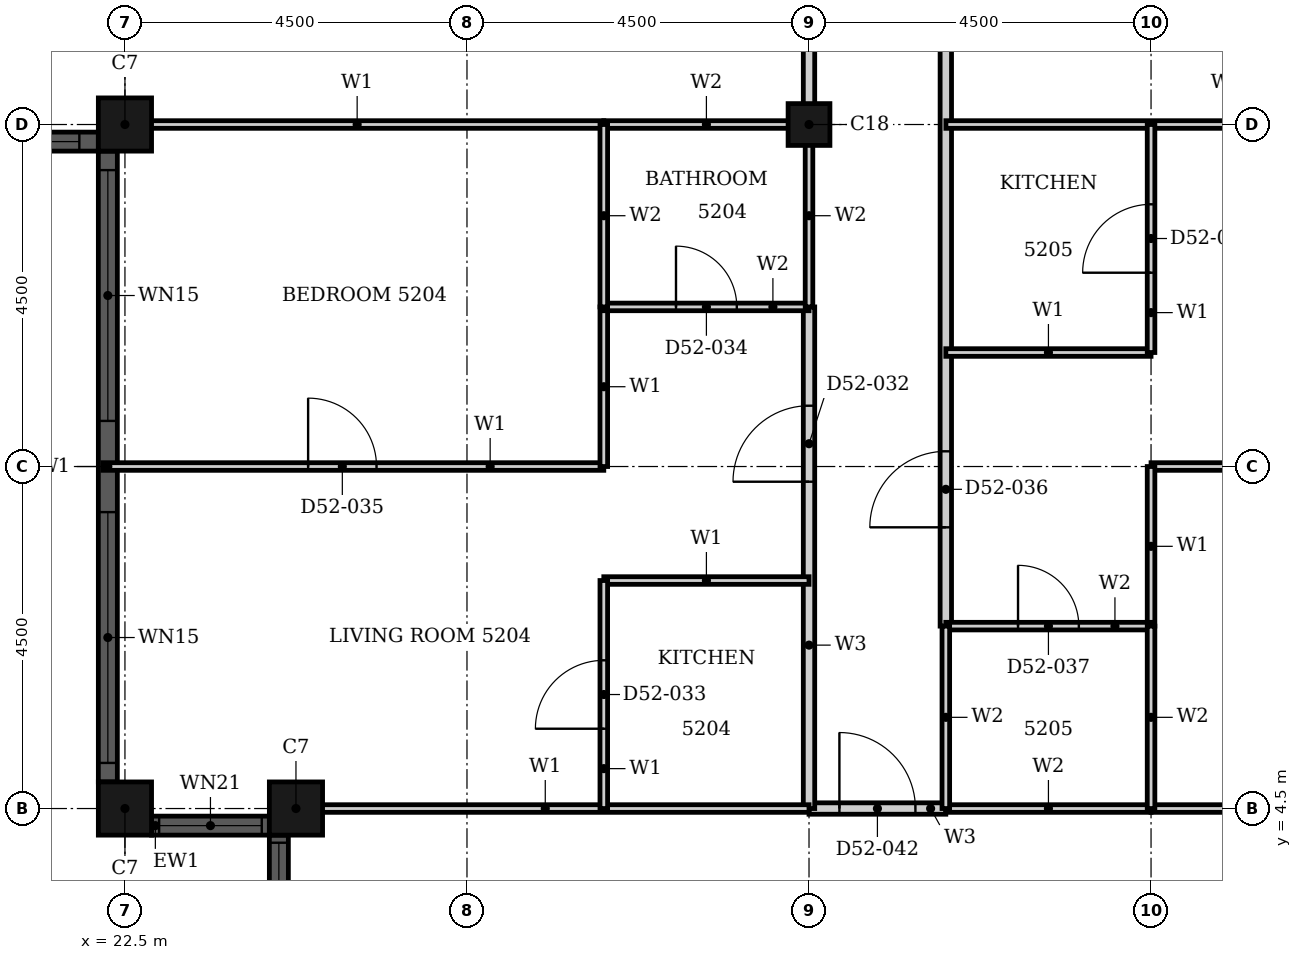
"""IFC4 building model, lengths in metres.
Left out: names, types, materials, properties, quantities, classifications, styles, units other than length and angle.
Written with IfcOpenShell. Run it as: python <this file> out.ifc"""

import sys

from ifc_helpers import new_model, si_unit, direction, frame, frame_2d, origin, origin_2d, place, context, subcontext, project, spatial, rectangle, hollow_rectangle, extrude, element, fill, save


model = new_model("IFC4")
c1 = context("Model", 3, precision=1e-05, world=origin(), true_north=direction((0.0, 1.0)))
c2 = subcontext(c1, "Body", "Model", "MODEL_VIEW")
j1 = project(units=[si_unit("LENGTHUNIT", "METRE"), si_unit("PLANEANGLEUNIT", "RADIAN")], contexts=[c1])
p1 = place(None, origin())
s1 = spatial("IfcSite", under=j1, at=p1, CompositionType="ELEMENT")
p2 = place(p1, origin())
s2 = spatial("IfcBuilding", under=s1, at=p2, CompositionType="ELEMENT")
p3 = place(p2, frame((0.0, 0.0, 207.2)))
s3 = spatial("IfcBuildingStorey", under=s2, at=p3, CompositionType="ELEMENT", Elevation=207.2)
for number, where, z_axis, x_axis in (
    (1, (22.5, 13.5, 0.0), (0.0, 0.0, 1.0), (1.0, 0.0, 0.0)),
    (2, (22.5, 4.5, 0.0), (0.0, 0.0, 1.0), (1.0, 0.0, 0.0)),
    (3, (24.75, 4.5, 0.0), (0.0, 0.0, 1.0), (1.0, 0.0, 0.0)),
):
    element("IfcColumn", number, at=place(p3, frame(where, z_axis=z_axis, x_axis=x_axis)), inside=s3, PredefinedType="COLUMN", context=c2, shape_type="SweptSolid", body=[
        extrude(hollow_rectangle(XDim=0.7, YDim=0.7, WallThickness=0.022, at=origin_2d()), origin(), (0.0, 0.0, 1.0), 3.7),
    ])
p4 = place(p3, frame((31.5, 13.5, 0.0), z_axis=(0.0, 0.0, 1.0), x_axis=(1.0, 0.0, 0.0)))
e4 = element("IfcColumn", 4, at=p4, inside=s3, PredefinedType="COLUMN", context=c2, shape_type="SweptSolid", body=[
    extrude(hollow_rectangle(XDim=0.55, YDim=0.55, WallThickness=0.018, at=origin_2d()), origin(), (0.0, 0.0, 1.0), 3.7),
])
p5 = place(p3, frame((18.35, 13.275, 0.0), z_axis=(0.0, 0.0, 1.0), x_axis=(1.0, 0.0, 0.0)))
e5 = element("IfcWall", 5, at=p5, inside=s3, PredefinedType="SOLIDWALL", context=c2, shape_type="SweptSolid", body=[
    extrude(rectangle(XDim=3.8, YDim=0.25, at=frame_2d((1.9, 0.0))), origin(), (0.0, 0.0, 1.0), 3.7),
])
p6 = place(p5, frame((0.25, 0.0, 0.45)))
e6 = element("IfcOpeningElement", 6, at=p6, cuts=e5, PredefinedType="OPENING", context=c2, shape_type="SweptSolid", body=[
    extrude(rectangle(XDim=3.3, YDim=2.3, at=frame_2d((1.65, 1.15))), frame((0.0, 0.135, 0.0), z_axis=(0.0, -1.0, 0.0), x_axis=(1.0, 0.0, 0.0)), (0.0, 0.0, 1.0), 0.27),
])
p7 = place(p3, frame((22.275, 13.15, 0.0), z_axis=(0.0, 0.0, 1.0), x_axis=(0.0, -1.0, 0.0)))
e7 = element("IfcWall", 7, at=p7, inside=s3, PredefinedType="SOLIDWALL", context=c2, shape_type="SweptSolid", body=[
    extrude(rectangle(XDim=8.3, YDim=0.25, at=frame_2d((4.15, 0.0))), origin(), (0.0, 0.0, 1.0), 3.7),
])
p8 = place(p7, frame((0.25, 0.0, 0.45)))
e8 = element("IfcOpeningElement", 8, at=p8, cuts=e7, PredefinedType="OPENING", context=c2, shape_type="SweptSolid", body=[
    extrude(rectangle(XDim=3.3, YDim=2.3, at=frame_2d((1.65, 1.15))), frame((0.0, 0.135, 0.0), z_axis=(0.0, -1.0, 0.0), x_axis=(1.0, 0.0, 0.0)), (0.0, 0.0, 1.0), 0.27),
])
p9 = place(p7, frame((4.75, 0.0, 0.45)))
e9 = element("IfcOpeningElement", 9, at=p9, cuts=e7, PredefinedType="OPENING", context=c2, shape_type="SweptSolid", body=[
    extrude(rectangle(XDim=3.3, YDim=2.3, at=frame_2d((1.65, 1.15))), frame((0.0, 0.135, 0.0), z_axis=(0.0, -1.0, 0.0), x_axis=(1.0, 0.0, 0.0)), (0.0, 0.0, 1.0), 0.27),
])
p10 = place(p3, frame((22.85, 4.275, 0.0), z_axis=(0.0, 0.0, 1.0), x_axis=(1.0, 0.0, 0.0)))
e10 = element("IfcWall", 10, at=p10, inside=s3, PredefinedType="SOLIDWALL", context=c2, shape_type="SweptSolid", body=[
    extrude(rectangle(XDim=1.55, YDim=0.25, at=frame_2d((0.775, 0.0))), origin(), (0.0, 0.0, 1.0), 3.7),
])
p11 = place(p10, frame((0.1, 0.0, 0.9)))
e11 = element("IfcOpeningElement", 11, at=p11, cuts=e10, PredefinedType="OPENING", context=c2, shape_type="SweptSolid", body=[
    extrude(rectangle(XDim=1.35, YDim=1.85, at=frame_2d((0.675, 0.925))), frame((0.0, 0.135, 0.0), z_axis=(0.0, -1.0, 0.0), x_axis=(1.0, 0.0, 0.0)), (0.0, 0.0, 1.0), 0.27),
])
p12 = place(p3, frame((24.525, 4.15, 0.0), z_axis=(0.0, 0.0, 1.0), x_axis=(0.0, -1.0, 0.0)))
e12 = element("IfcWall", 12, at=p12, inside=s3, PredefinedType="SOLIDWALL", context=c2, shape_type="SweptSolid", body=[
    extrude(rectangle(XDim=1.55, YDim=0.25, at=frame_2d((0.775, 0.0))), origin(), (0.0, 0.0, 1.0), 3.7),
])
p13 = place(p12, frame((0.1, 0.0, 0.9)))
e13 = element("IfcOpeningElement", 13, at=p13, cuts=e12, PredefinedType="OPENING", context=c2, shape_type="SweptSolid", body=[
    extrude(rectangle(XDim=1.35, YDim=1.85, at=frame_2d((0.675, 0.925))), frame((0.0, 0.135, 0.0), z_axis=(0.0, -1.0, 0.0), x_axis=(1.0, 0.0, 0.0)), (0.0, 0.0, 1.0), 0.27),
])
p14 = place(p3, frame((31.5, 4.5, 0.0), z_axis=(0.0, 0.0, 1.0), x_axis=(1.0, 0.0, 0.0)))
e14 = element("IfcWall", 14, at=p14, inside=s3, PredefinedType="PARTITIONING", context=c2, shape_type="SweptSolid", body=[
    extrude(rectangle(XDim=1.8, YDim=0.15, at=frame_2d((0.9, 0.0))), origin(), (0.0, 0.0, 1.0), 3.4),
])
p15 = place(p14, frame((0.4, 0.0, 0.0)))
e15 = element("IfcOpeningElement", 15, at=p15, cuts=e14, PredefinedType="OPENING", context=c2, shape_type="SweptSolid", body=[
    extrude(rectangle(XDim=1.0, YDim=2.1, at=frame_2d((0.5, 1.05))), frame((0.0, 0.085, 0.0), z_axis=(0.0, -1.0, 0.0), x_axis=(1.0, 0.0, 0.0)), (0.0, 0.0, 1.0), 0.17),
])
p16 = place(p3, frame((31.5, 4.5, 0.0), z_axis=(0.0, 0.0, 1.0), x_axis=(0.0, 1.0, 0.0)))
e16 = element("IfcWall", 16, at=p16, inside=s3, PredefinedType="PARTITIONING", context=c2, shape_type="SweptSolid", body=[
    extrude(rectangle(XDim=6.6, YDim=0.15, at=frame_2d((3.3, 0.0))), origin(), (0.0, 0.0, 1.0), 2.68),
])
p17 = place(p16, frame((4.3, 0.0, 0.0)))
e17 = element("IfcOpeningElement", 17, at=p17, cuts=e16, PredefinedType="OPENING", context=c2, shape_type="SweptSolid", body=[
    extrude(rectangle(XDim=1.0, YDim=2.2, at=frame_2d((0.5, 1.1))), frame((0.0, 0.085, 0.0), z_axis=(0.0, -1.0, 0.0), x_axis=(1.0, 0.0, 0.0)), (0.0, 0.0, 1.0), 0.17),
])
p18 = place(p3, frame((31.5, 13.5, 0.0), z_axis=(0.0, 0.0, 1.0), x_axis=(0.0, 1.0, 0.0)))
e18 = element("IfcWall", 18, at=p18, inside=s3, PredefinedType="PARTITIONING", context=c2, shape_type="SweptSolid", body=[
    extrude(rectangle(XDim=7.2, YDim=0.15, at=frame_2d((3.6, 0.0))), origin(), (0.0, 0.0, 1.0), 3.4),
])
p19 = place(p3, frame((33.3, 6.9, 0.0), z_axis=(0.0, 0.0, 1.0), x_axis=(0.0, 1.0, 0.0)))
e19 = element("IfcWall", 19, at=p19, inside=s3, PredefinedType="PARTITIONING", context=c2, shape_type="SweptSolid", body=[
    extrude(rectangle(XDim=13.799, YDim=0.15, at=frame_2d((6.899, 0.0))), origin(), (0.0, 0.0, 1.0), 3.4),
])
p20 = place(p19, frame((1.3, 0.0, 0.0)))
e20 = element("IfcOpeningElement", 20, at=p20, cuts=e19, PredefinedType="OPENING", context=c2, shape_type="SweptSolid", body=[
    extrude(rectangle(XDim=1.0, YDim=2.2, at=frame_2d((0.5, 1.1))), frame((0.0, 0.085, 0.0), z_axis=(0.0, -1.0, 0.0), x_axis=(1.0, 0.0, 0.0)), (0.0, 0.0, 1.0), 0.17),
])
p21 = place(p3, frame((33.3, 10.5, 0.0), z_axis=(0.0, 0.0, 1.0), x_axis=(1.0, 0.0, 0.0)))
e21 = element("IfcWall", 21, at=p21, inside=s3, PredefinedType="PARTITIONING", context=c2, shape_type="SweptSolid", body=[
    extrude(rectangle(XDim=2.7, YDim=0.1, at=frame_2d((1.35, 0.0))), origin(), (0.0, 0.0, 1.0), 3.4),
])
p22 = place(p3, frame((33.301, 13.5, 0.0), z_axis=(0.0, 0.0, 1.0), x_axis=(1.0, 0.0, 0.0)))
e22 = element("IfcWall", 22, at=p22, inside=s3, PredefinedType="PARTITIONING", context=c2, shape_type="SweptSolid", body=[
    extrude(rectangle(XDim=7.389, YDim=0.1, at=frame_2d((3.694, 0.0))), origin(), (0.0, 0.0, 1.0), 2.48),
])
p23 = place(p3, frame((22.31, 13.5, 0.0), z_axis=(0.0, 0.0, 1.0), x_axis=(1.0, 0.0, 0.0)))
e23 = element("IfcWall", 23, at=p23, inside=s3, PredefinedType="PARTITIONING", context=c2, shape_type="SweptSolid", body=[
    extrude(rectangle(XDim=6.49, YDim=0.1, at=frame_2d((3.245, 0.0))), origin(), (0.0, 0.0, 1.0), 2.48),
])
p24 = place(p3, frame((36.0, 4.5, 0.0), z_axis=(0.0, 0.0, 1.0), x_axis=(1.0, 0.0, 0.0)))
e24 = element("IfcWall", 24, at=p24, inside=s3, PredefinedType="PARTITIONING", context=c2, shape_type="SweptSolid", body=[
    extrude(rectangle(XDim=2.44, YDim=0.1, at=frame_2d((1.22, 0.0))), origin(), (0.0, 0.0, 1.0), 3.4),
])
p25 = place(p3, frame((24.56, 4.5, 0.0), z_axis=(0.0, 0.0, 1.0), x_axis=(1.0, 0.0, 0.0)))
e25 = element("IfcWall", 25, at=p25, inside=s3, PredefinedType="PARTITIONING", context=c2, shape_type="SweptSolid", body=[
    extrude(rectangle(XDim=6.94, YDim=0.1, at=frame_2d((3.47, 0.0))), origin(), (0.0, 0.0, 1.0), 3.4),
])
p26 = place(p3, frame((28.8, 7.5, 0.0), z_axis=(0.0, 0.0, 1.0), x_axis=(1.0, 0.0, 0.0)))
e26 = element("IfcWall", 26, at=p26, inside=s3, PredefinedType="PARTITIONING", context=c2, shape_type="SweptSolid", body=[
    extrude(rectangle(XDim=2.7, YDim=0.1, at=frame_2d((1.35, 0.0))), origin(), (0.0, 0.0, 1.0), 3.4),
])
p27 = place(p3, frame((36.0, 9.0, 0.0), z_axis=(0.0, 0.0, 1.0), x_axis=(1.0, 0.0, 0.0)))
e27 = element("IfcWall", 27, at=p27, inside=s3, PredefinedType="PARTITIONING", context=c2, shape_type="SweptSolid", body=[
    extrude(rectangle(XDim=4.79, YDim=0.1, at=frame_2d((2.395, 0.0))), origin(), (0.0, 0.0, 1.0), 3.4),
])
p28 = place(p27, frame((1.8, 0.0, 0.0)))
e28 = element("IfcOpeningElement", 28, at=p28, cuts=e27, PredefinedType="OPENING", context=c2, shape_type="SweptSolid", body=[
    extrude(rectangle(XDim=0.9, YDim=2.1, at=frame_2d((0.45, 1.05))), frame((0.0, 0.06, 0.0), z_axis=(0.0, -1.0, 0.0), x_axis=(1.0, 0.0, 0.0)), (0.0, 0.0, 1.0), 0.12),
])
p29 = place(p3, frame((22.21, 9.0, 0.0), z_axis=(0.0, 0.0, 1.0), x_axis=(1.0, 0.0, 0.0)))
e29 = element("IfcWall", 29, at=p29, inside=s3, PredefinedType="PARTITIONING", context=c2, shape_type="SweptSolid", body=[
    extrude(rectangle(XDim=6.59, YDim=0.1, at=frame_2d((3.295, 0.0))), origin(), (0.0, 0.0, 1.0), 3.4),
])
p30 = place(p29, frame((2.7, 0.0, 0.0)))
e30 = element("IfcOpeningElement", 30, at=p30, cuts=e29, PredefinedType="OPENING", context=c2, shape_type="SweptSolid", body=[
    extrude(rectangle(XDim=0.9, YDim=2.1, at=frame_2d((0.45, 1.05))), frame((0.0, 0.06, 0.0), z_axis=(0.0, -1.0, 0.0), x_axis=(1.0, 0.0, 0.0)), (0.0, 0.0, 1.0), 0.12),
])
p31 = place(p3, frame((28.8, 9.0, 0.0), z_axis=(0.0, 0.0, 1.0), x_axis=(0.0, 1.0, 0.0)))
e31 = element("IfcWall", 31, at=p31, inside=s3, PredefinedType="PARTITIONING", context=c2, shape_type="SweptSolid", body=[
    extrude(rectangle(XDim=2.1, YDim=0.1, at=frame_2d((1.05, 0.0))), origin(), (0.0, 0.0, 1.0), 3.4),
])
p32 = place(p3, frame((28.8, 4.5, 0.0), z_axis=(0.0, 0.0, 1.0), x_axis=(0.0, 1.0, 0.0)))
e32 = element("IfcWall", 32, at=p32, inside=s3, PredefinedType="PARTITIONING", context=c2, shape_type="SweptSolid", body=[
    extrude(rectangle(XDim=3.0, YDim=0.1, at=frame_2d((1.5, 0.0))), origin(), (0.0, 0.0, 1.0), 3.4),
])
p33 = place(p32, frame((1.05, 0.0, 0.0)))
e33 = element("IfcOpeningElement", 33, at=p33, cuts=e32, PredefinedType="OPENING", context=c2, shape_type="SweptSolid", body=[
    extrude(rectangle(XDim=0.9, YDim=2.1, at=frame_2d((0.45, 1.05))), frame((0.0, 0.06, 0.0), z_axis=(0.0, -1.0, 0.0), x_axis=(1.0, 0.0, 0.0)), (0.0, 0.0, 1.0), 0.12),
])
p34 = place(p3, frame((36.0, 6.9, 0.0), z_axis=(0.0, 0.0, 1.0), x_axis=(0.0, 1.0, 0.0)))
e34 = element("IfcWall", 34, at=p34, inside=s3, PredefinedType="PARTITIONING", context=c2, shape_type="SweptSolid", body=[
    extrude(rectangle(XDim=2.1, YDim=0.1, at=frame_2d((1.05, 0.0))), origin(), (0.0, 0.0, 1.0), 2.68),
])
p35 = place(p3, frame((36.0, 10.5, 0.0), z_axis=(0.0, 0.0, 1.0), x_axis=(0.0, 1.0, 0.0)))
e35 = element("IfcWall", 35, at=p35, inside=s3, PredefinedType="PARTITIONING", context=c2, shape_type="SweptSolid", body=[
    extrude(rectangle(XDim=3.0, YDim=0.1, at=frame_2d((1.5, 0.0))), origin(), (0.0, 0.0, 1.0), 2.68),
])
p36 = place(p35, frame((1.05, 0.0, 0.0)))
e36 = element("IfcOpeningElement", 36, at=p36, cuts=e35, PredefinedType="OPENING", context=c2, shape_type="SweptSolid", body=[
    extrude(rectangle(XDim=0.9, YDim=2.1, at=frame_2d((0.45, 1.05))), frame((0.0, 0.06, 0.0), z_axis=(0.0, -1.0, 0.0), x_axis=(1.0, 0.0, 0.0)), (0.0, 0.0, 1.0), 0.12),
])
p37 = place(p3, frame((28.8, 11.1, 0.0), z_axis=(0.0, 0.0, 1.0), x_axis=(1.0, 0.0, 0.0)))
e37 = element("IfcWall", 37, at=p37, inside=s3, PredefinedType="PARTITIONING", context=c2, shape_type="SweptSolid", body=[
    extrude(rectangle(XDim=2.7, YDim=0.1, at=frame_2d((1.35, 0.0))), origin(), (0.0, 0.0, 1.0), 3.4),
])
p38 = place(p37, frame((0.95, 0.0, 0.0)))
e38 = element("IfcOpeningElement", 38, at=p38, cuts=e37, PredefinedType="OPENING", context=c2, shape_type="SweptSolid", body=[
    extrude(rectangle(XDim=0.8, YDim=2.1, at=frame_2d((0.4, 1.05))), frame((0.0, 0.06, 0.0), z_axis=(0.0, -1.0, 0.0), x_axis=(1.0, 0.0, 0.0)), (0.0, 0.0, 1.0), 0.12),
])
p39 = place(p3, frame((28.8, 13.5, 0.0), z_axis=(0.0, 0.0, 1.0), x_axis=(1.0, 0.0, 0.0)))
e39 = element("IfcWall", 39, at=p39, inside=s3, PredefinedType="PARTITIONING", context=c2, shape_type="SweptSolid", body=[
    extrude(rectangle(XDim=2.7, YDim=0.1, at=frame_2d((1.35, 0.0))), origin(), (0.0, 0.0, 1.0), 2.48),
])
p40 = place(p3, frame((33.3, 4.5, 0.0), z_axis=(0.0, 0.0, 1.0), x_axis=(1.0, 0.0, 0.0)))
e40 = element("IfcWall", 40, at=p40, inside=s3, PredefinedType="PARTITIONING", context=c2, shape_type="SweptSolid", body=[
    extrude(rectangle(XDim=2.7, YDim=0.1, at=frame_2d((1.35, 0.0))), origin(), (0.0, 0.0, 1.0), 3.4),
])
p41 = place(p3, frame((33.3, 6.9, 0.0), z_axis=(0.0, 0.0, 1.0), x_axis=(1.0, 0.0, 0.0)))
e41 = element("IfcWall", 41, at=p41, inside=s3, PredefinedType="PARTITIONING", context=c2, shape_type="SweptSolid", body=[
    extrude(rectangle(XDim=2.7, YDim=0.1, at=frame_2d((1.35, 0.0))), origin(), (0.0, 0.0, 1.0), 3.4),
])
p42 = place(p41, frame((0.95, 0.0, 0.0)))
e42 = element("IfcOpeningElement", 42, at=p42, cuts=e41, PredefinedType="OPENING", context=c2, shape_type="SweptSolid", body=[
    extrude(rectangle(XDim=0.8, YDim=2.1, at=frame_2d((0.4, 1.05))), frame((0.0, 0.06, 0.0), z_axis=(0.0, -1.0, 0.0), x_axis=(1.0, 0.0, 0.0)), (0.0, 0.0, 1.0), 0.12),
])
p43 = place(p3, frame((28.8, 11.1, 0.0), z_axis=(0.0, 0.0, 1.0), x_axis=(0.0, 1.0, 0.0)))
e43 = element("IfcWall", 43, at=p43, inside=s3, PredefinedType="PARTITIONING", context=c2, shape_type="SweptSolid", body=[
    extrude(rectangle(XDim=2.4, YDim=0.1, at=frame_2d((1.2, 0.0))), origin(), (0.0, 0.0, 1.0), 3.4),
])
p44 = place(p3, frame((31.5, 11.1, 0.0), z_axis=(0.0, 0.0, 1.0), x_axis=(0.0, 1.0, 0.0)))
e44 = element("IfcWall", 44, at=p44, inside=s3, PredefinedType="PARTITIONING", context=c2, shape_type="SweptSolid", body=[
    extrude(rectangle(XDim=2.4, YDim=0.1, at=frame_2d((1.2, 0.0))), origin(), (0.0, 0.0, 1.0), 2.68),
])
p45 = place(p3, frame((33.3, 4.5, 0.0), z_axis=(0.0, 0.0, 1.0), x_axis=(0.0, 1.0, 0.0)))
e45 = element("IfcWall", 45, at=p45, inside=s3, PredefinedType="PARTITIONING", context=c2, shape_type="SweptSolid", body=[
    extrude(rectangle(XDim=2.4, YDim=0.1, at=frame_2d((1.2, 0.0))), origin(), (0.0, 0.0, 1.0), 3.4),
])
p46 = place(p3, frame((36.0, 4.5, 0.0), z_axis=(0.0, 0.0, 1.0), x_axis=(0.0, 1.0, 0.0)))
e46 = element("IfcWall", 46, at=p46, inside=s3, PredefinedType="PARTITIONING", context=c2, shape_type="SweptSolid", body=[
    extrude(rectangle(XDim=2.4, YDim=0.1, at=frame_2d((1.2, 0.0))), origin(), (0.0, 0.0, 1.0), 2.68),
])
p47 = place(p6, origin())
e47 = element("IfcWindow", 47, at=p47, inside=s3, PartitioningType="SINGLE_PANEL", PredefinedType="WINDOW", context=c2, shape_type="SweptSolid", body=[
    extrude(rectangle(XDim=3.3, YDim=2.3, at=frame_2d((1.65, 1.15))), frame((0.0, 0.03, 0.0), z_axis=(0.0, -1.0, 0.0), x_axis=(1.0, 0.0, 0.0)), (0.0, 0.0, 1.0), 0.06),
])
fill(e6, e47)
p48 = place(p8, origin())
e48 = element("IfcWindow", 48, at=p48, inside=s3, PartitioningType="SINGLE_PANEL", PredefinedType="WINDOW", context=c2, shape_type="SweptSolid", body=[
    extrude(rectangle(XDim=3.3, YDim=2.3, at=frame_2d((1.65, 1.15))), frame((0.0, 0.03, 0.0), z_axis=(0.0, -1.0, 0.0), x_axis=(1.0, 0.0, 0.0)), (0.0, 0.0, 1.0), 0.06),
])
fill(e8, e48)
p49 = place(p9, origin())
e49 = element("IfcWindow", 49, at=p49, inside=s3, PartitioningType="SINGLE_PANEL", PredefinedType="WINDOW", context=c2, shape_type="SweptSolid", body=[
    extrude(rectangle(XDim=3.3, YDim=2.3, at=frame_2d((1.65, 1.15))), frame((0.0, 0.03, 0.0), z_axis=(0.0, -1.0, 0.0), x_axis=(1.0, 0.0, 0.0)), (0.0, 0.0, 1.0), 0.06),
])
fill(e9, e49)
p50 = place(p11, origin())
e50 = element("IfcWindow", 50, at=p50, inside=s3, PartitioningType="SINGLE_PANEL", PredefinedType="WINDOW", context=c2, shape_type="SweptSolid", body=[
    extrude(rectangle(XDim=1.35, YDim=1.85, at=frame_2d((0.675, 0.925))), frame((0.0, 0.03, 0.0), z_axis=(0.0, -1.0, 0.0), x_axis=(1.0, 0.0, 0.0)), (0.0, 0.0, 1.0), 0.06),
])
fill(e11, e50)
p51 = place(p13, origin())
e51 = element("IfcWindow", 51, at=p51, inside=s3, PartitioningType="SINGLE_PANEL", PredefinedType="WINDOW", context=c2, shape_type="SweptSolid", body=[
    extrude(rectangle(XDim=1.35, YDim=1.85, at=frame_2d((0.675, 0.925))), frame((0.0, 0.03, 0.0), z_axis=(0.0, -1.0, 0.0), x_axis=(1.0, 0.0, 0.0)), (0.0, 0.0, 1.0), 0.06),
])
fill(e13, e51)
p52 = place(p17, origin())
e52 = element("IfcDoor", 52, at=p52, inside=s3, OperationType="SINGLE_SWING_RIGHT", PredefinedType="DOOR", context=c2, shape_type="SweptSolid", body=[
    extrude(rectangle(XDim=1.0, YDim=2.2, at=frame_2d((0.5, 1.1))), frame((0.0, 0.025, 0.0), z_axis=(0.0, -1.0, 0.0), x_axis=(1.0, 0.0, 0.0)), (0.0, 0.0, 1.0), 0.05),
])
fill(e17, e52)
p53 = place(p33, origin())
e53 = element("IfcDoor", 53, at=p53, inside=s3, OperationType="SINGLE_SWING_LEFT", PredefinedType="DOOR", context=c2, shape_type="SweptSolid", body=[
    extrude(rectangle(XDim=0.9, YDim=2.1, at=frame_2d((0.45, 1.05))), frame((0.0, 0.025, 0.0), z_axis=(0.0, -1.0, 0.0), x_axis=(1.0, 0.0, 0.0)), (0.0, 0.0, 1.0), 0.05),
])
fill(e33, e53)
p54 = place(p38, origin())
e54 = element("IfcDoor", 54, at=p54, inside=s3, OperationType="SINGLE_SWING_RIGHT", PredefinedType="DOOR", context=c2, shape_type="SweptSolid", body=[
    extrude(rectangle(XDim=0.8, YDim=2.1, at=frame_2d((0.4, 1.05))), frame((0.0, 0.025, 0.0), z_axis=(0.0, -1.0, 0.0), x_axis=(1.0, 0.0, 0.0)), (0.0, 0.0, 1.0), 0.05),
])
fill(e38, e54)
p55 = place(p30, origin())
e55 = element("IfcDoor", 55, at=p55, inside=s3, OperationType="SINGLE_SWING_RIGHT", PredefinedType="DOOR", context=c2, shape_type="SweptSolid", body=[
    extrude(rectangle(XDim=0.9, YDim=2.1, at=frame_2d((0.45, 1.05))), frame((0.0, 0.025, 0.0), z_axis=(0.0, -1.0, 0.0), x_axis=(1.0, 0.0, 0.0)), (0.0, 0.0, 1.0), 0.05),
])
fill(e30, e55)
p56 = place(p20, origin())
e56 = element("IfcDoor", 56, at=p56, inside=s3, OperationType="SINGLE_SWING_LEFT", PredefinedType="DOOR", context=c2, shape_type="SweptSolid", body=[
    extrude(rectangle(XDim=1.0, YDim=2.2, at=frame_2d((0.5, 1.1))), frame((0.0, 0.025, 0.0), z_axis=(0.0, -1.0, 0.0), x_axis=(1.0, 0.0, 0.0)), (0.0, 0.0, 1.0), 0.05),
])
fill(e20, e56)
p57 = place(p42, origin())
e57 = element("IfcDoor", 57, at=p57, inside=s3, OperationType="SINGLE_SWING_LEFT", PredefinedType="DOOR", context=c2, shape_type="SweptSolid", body=[
    extrude(rectangle(XDim=0.8, YDim=2.1, at=frame_2d((0.4, 1.05))), frame((0.0, 0.025, 0.0), z_axis=(0.0, -1.0, 0.0), x_axis=(1.0, 0.0, 0.0)), (0.0, 0.0, 1.0), 0.05),
])
fill(e42, e57)
p58 = place(p36, origin())
e58 = element("IfcDoor", 58, at=p58, inside=s3, OperationType="SINGLE_SWING_RIGHT", PredefinedType="DOOR", context=c2, shape_type="SweptSolid", body=[
    extrude(rectangle(XDim=0.9, YDim=2.1, at=frame_2d((0.45, 1.05))), frame((0.0, 0.025, 0.0), z_axis=(0.0, -1.0, 0.0), x_axis=(1.0, 0.0, 0.0)), (0.0, 0.0, 1.0), 0.05),
])
fill(e36, e58)
p59 = place(p15, origin())
e59 = element("IfcDoor", 59, at=p59, inside=s3, OperationType="SINGLE_SWING_RIGHT", PredefinedType="DOOR", context=c2, shape_type="SweptSolid", body=[
    extrude(rectangle(XDim=1.0, YDim=2.1, at=frame_2d((0.5, 1.05))), frame((0.0, 0.025, 0.0), z_axis=(0.0, -1.0, 0.0), x_axis=(1.0, 0.0, 0.0)), (0.0, 0.0, 1.0), 0.05),
])
fill(e15, e59)
save(model, sys.argv[1])
